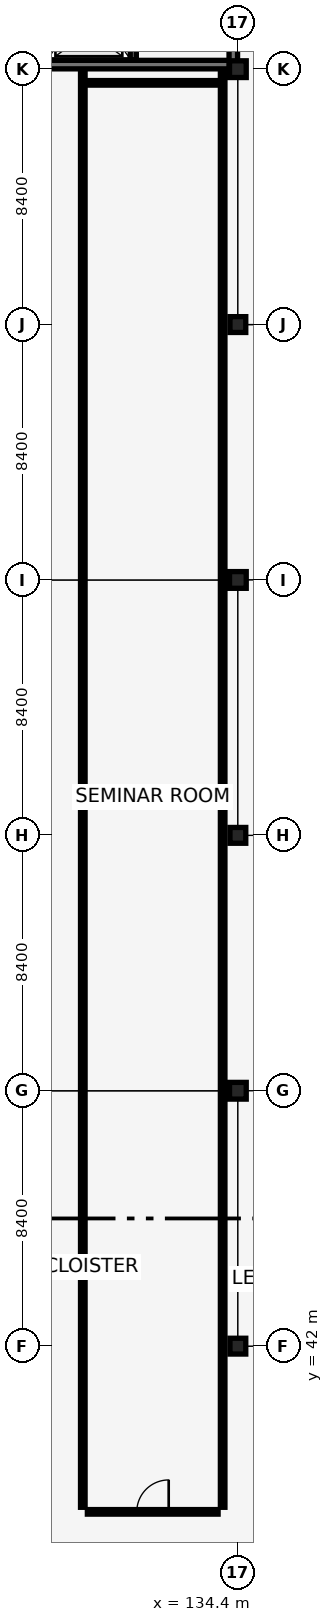
"""IFC4 building model, lengths in metres.
Left out: names, types, materials, properties, quantities, classifications, styles, units other than length and angle.
Written with IfcOpenShell. Run it as: python <this file> out.ifc"""

import sys

from ifc_helpers import new_model, si_unit, direction, frame, frame_2d, origin, origin_2d, place, context, subcontext, project, spatial, rectangle, extrude, element, fill, save


model = new_model("IFC4")
c1 = context("Model", 3, precision=1e-05, world=origin(), true_north=direction((0.0, 1.0)))
c2 = subcontext(c1, "Body", "Model", "MODEL_VIEW")
j1 = project(units=[si_unit("LENGTHUNIT", "METRE"), si_unit("PLANEANGLEUNIT", "RADIAN")], contexts=[c1])
p1 = place(None, origin())
s1 = spatial("IfcSite", under=j1, at=p1, CompositionType="ELEMENT")
p2 = place(p1, origin())
s2 = spatial("IfcBuilding", under=s1, at=p2, CompositionType="ELEMENT")
p3 = place(p2, frame((0.0, 0.0, 22.1)))
s3 = spatial("IfcBuildingStorey", under=s2, at=p3, CompositionType="ELEMENT", Elevation=22.1)
p4 = place(p3, frame((126.15, 84.15, 0.0), z_axis=(0.0, 0.0, 1.0), x_axis=(1.0, 0.0, 0.0)))
e1 = element("IfcWall", 1, at=p4, inside=s3, PredefinedType="SHEAR", context=c2, shape_type="SweptSolid", body=[
    extrude(rectangle(XDim=8.1, YDim=0.28, at=frame_2d((4.05, 0.0))), origin(), (0.0, 0.0, 1.0), 3.78),
])
p5 = place(p4, frame((0.485, 0.0, 0.0)))
e2 = element("IfcOpeningElement", 2, at=p5, cuts=e1, PredefinedType="OPENING", context=c2, shape_type="SweptSolid", body=[
    extrude(rectangle(XDim=1.0, YDim=2.15, at=frame_2d((0.5, 1.075))), frame((0.0, 0.15, 0.0), z_axis=(0.0, -1.0, 0.0), x_axis=(1.0, 0.0, 0.0)), (0.0, 0.0, 1.0), 0.3),
])
p6 = place(p3, frame((134.25, 84.15, 0.0), z_axis=(0.0, 0.0, 1.0), x_axis=(0.0, 1.0, 0.0)))
e3 = element("IfcWall", 3, at=p6, inside=s3, PredefinedType="SHEAR", context=c2, shape_type="SweptSolid", body=[
    extrude(rectangle(XDim=8.1, YDim=0.28, at=frame_2d((4.05, 0.0))), origin(), (0.0, 0.0, 1.0), 3.78),
])
p7 = place(p6, frame((1.325, 0.0, 0.0)))
e4 = element("IfcOpeningElement", 4, at=p7, cuts=e3, PredefinedType="OPENING", context=c2, shape_type="SweptSolid", body=[
    extrude(rectangle(XDim=1.45, YDim=2.15, at=frame_2d((0.725, 1.075))), frame((0.0, 0.15, 0.0), z_axis=(0.0, -1.0, 0.0), x_axis=(1.0, 0.0, 0.0)), (0.0, 0.0, 1.0), 0.3),
])
p8 = place(p3, frame((134.4, 42.0, 0.0), z_axis=(0.0, 0.0, 1.0), x_axis=(1.0, 0.0, 0.0)))
e5 = element("IfcColumn", 5, at=p8, inside=s3, PredefinedType="COLUMN", context=c2, shape_type="SweptSolid", body=[
    extrude(rectangle(XDim=0.52, YDim=0.52, at=origin_2d()), origin(), (0.0, 0.0, 1.0), 3.78),
])
p9 = place(p3, frame((134.4, 50.4, 0.0), z_axis=(0.0, 0.0, 1.0), x_axis=(1.0, 0.0, 0.0)))
e6 = element("IfcColumn", 6, at=p9, inside=s3, PredefinedType="COLUMN", context=c2, shape_type="SweptSolid", body=[
    extrude(rectangle(XDim=0.55, YDim=0.55, at=origin_2d()), origin(), (0.0, 0.0, 1.0), 3.78),
])
p10 = place(p3, frame((134.4, 58.8, 0.0), z_axis=(0.0, 0.0, 1.0), x_axis=(1.0, 0.0, 0.0)))
e7 = element("IfcColumn", 7, at=p10, inside=s3, PredefinedType="COLUMN", context=c2, shape_type="SweptSolid", body=[
    extrude(rectangle(XDim=0.52, YDim=0.52, at=origin_2d()), origin(), (0.0, 0.0, 1.0), 3.78),
])
p11 = place(p3, frame((134.4, 67.2, 0.0), z_axis=(0.0, 0.0, 1.0), x_axis=(1.0, 0.0, 0.0)))
e8 = element("IfcColumn", 8, at=p11, inside=s3, PredefinedType="COLUMN", context=c2, shape_type="SweptSolid", body=[
    extrude(rectangle(XDim=0.55, YDim=0.55, at=origin_2d()), origin(), (0.0, 0.0, 1.0), 3.78),
])
p12 = place(p3, frame((134.4, 75.6, 0.0), z_axis=(0.0, 0.0, 1.0), x_axis=(1.0, 0.0, 0.0)))
e9 = element("IfcColumn", 9, at=p12, inside=s3, PredefinedType="COLUMN", context=c2, shape_type="SweptSolid", body=[
    extrude(rectangle(XDim=0.52, YDim=0.52, at=origin_2d()), origin(), (0.0, 0.0, 1.0), 3.78),
])
p13 = place(p3, frame((134.4, 84.0, 0.0), z_axis=(0.0, 0.0, 1.0), x_axis=(1.0, 0.0, 0.0)))
e10 = element("IfcColumn", 10, at=p13, inside=s3, PredefinedType="COLUMN", context=c2, shape_type="SweptSolid", body=[
    extrude(rectangle(XDim=0.55, YDim=0.55, at=origin_2d()), origin(), (0.0, 0.0, 1.0), 3.78),
])
p14 = place(p3, frame((130.96, 84.3, 0.0), z_axis=(0.0, 0.0, 1.0), x_axis=(0.0, 1.0, 0.0)))
e11 = element("IfcWall", 11, at=p14, inside=s3, PredefinedType="SHEAR", context=c2, shape_type="SweptSolid", body=[
    extrude(rectangle(XDim=3.8, YDim=0.2, at=frame_2d((1.9, 0.0))), origin(), (0.0, 0.0, 1.0), 3.08),
])
p15 = place(p14, frame((0.375, 0.0, 0.0)))
e12 = element("IfcOpeningElement", 12, at=p15, cuts=e11, PredefinedType="OPENING", context=c2, shape_type="SweptSolid", body=[
    extrude(rectangle(XDim=1.1, YDim=2.15, at=frame_2d((0.55, 1.075))), frame((0.0, 0.11, 0.0), z_axis=(0.0, -1.0, 0.0), x_axis=(1.0, 0.0, 0.0)), (0.0, 0.0, 1.0), 0.22),
])
p16 = place(p14, frame((2.175, 0.0, 0.0)))
e13 = element("IfcOpeningElement", 13, at=p16, cuts=e11, PredefinedType="OPENING", context=c2, shape_type="SweptSolid", body=[
    extrude(rectangle(XDim=1.4, YDim=2.2, at=frame_2d((0.7, 1.1))), frame((0.0, 0.11, 0.0), z_axis=(0.0, -1.0, 0.0), x_axis=(1.0, 0.0, 0.0)), (0.0, 0.0, 1.0), 0.22),
])
p17 = place(p3, frame((129.45, 36.55, 0.0), z_axis=(0.0, 0.0, 1.0), x_axis=(1.0, 0.0, 0.0)))
e14 = element("IfcWall", 14, at=p17, inside=s3, PredefinedType="PARTITIONING", context=c2, shape_type="SweptSolid", body=[
    extrude(rectangle(XDim=4.3, YDim=0.15, at=frame_2d((2.15, 0.0))), origin(), (0.0, 0.0, 1.0), 3.78),
])
p18 = place(p17, frame((1.625, 0.0, 0.0)))
e15 = element("IfcOpeningElement", 15, at=p18, cuts=e14, PredefinedType="OPENING", context=c2, shape_type="SweptSolid", body=[
    extrude(rectangle(XDim=1.05, YDim=2.15, at=frame_2d((0.525, 1.075))), frame((0.0, 0.085, 0.0), z_axis=(0.0, -1.0, 0.0), x_axis=(1.0, 0.0, 0.0)), (0.0, 0.0, 1.0), 0.17),
])
for number, where, z_axis, x_axis in (
    (16, (129.3, 36.7, 0.0), (0.0, 0.0, 1.0), (0.0, 1.0, 0.0)),
    (17, (133.9, 36.7, 0.0), (0.0, 0.0, 1.0), (0.0, 1.0, 0.0)),
):
    element("IfcWall", number, at=place(p3, frame(where, z_axis=z_axis, x_axis=x_axis)), inside=s3, PredefinedType="PARTITIONING", context=c2, shape_type="SweptSolid", body=[
        extrude(rectangle(XDim=47.27, YDim=0.15, at=frame_2d((23.635, 0.0))), origin(), (0.0, 0.0, 1.0), 3.08),
    ])
p19 = place(p3, frame((129.45, 83.55, 0.0), z_axis=(0.0, 0.0, 1.0), x_axis=(1.0, 0.0, 0.0)))
e18 = element("IfcWall", 18, at=p19, inside=s3, PredefinedType="PARTITIONING", context=c2, shape_type="SweptSolid", body=[
    extrude(rectangle(XDim=4.3, YDim=0.15, at=frame_2d((2.15, 0.0))), origin(), (0.0, 0.0, 1.0), 3.78),
])
p20 = place(p18, origin())
e19 = element("IfcDoor", 19, at=p20, inside=s3, OperationType="SINGLE_SWING_RIGHT", PredefinedType="DOOR", context=c2, shape_type="SweptSolid", body=[
    extrude(rectangle(XDim=1.05, YDim=2.15, at=frame_2d((0.525, 1.075))), frame((0.0, 0.025, 0.0), z_axis=(0.0, -1.0, 0.0), x_axis=(1.0, 0.0, 0.0)), (0.0, 0.0, 1.0), 0.05),
])
fill(e15, e19)
save(model, sys.argv[1])
